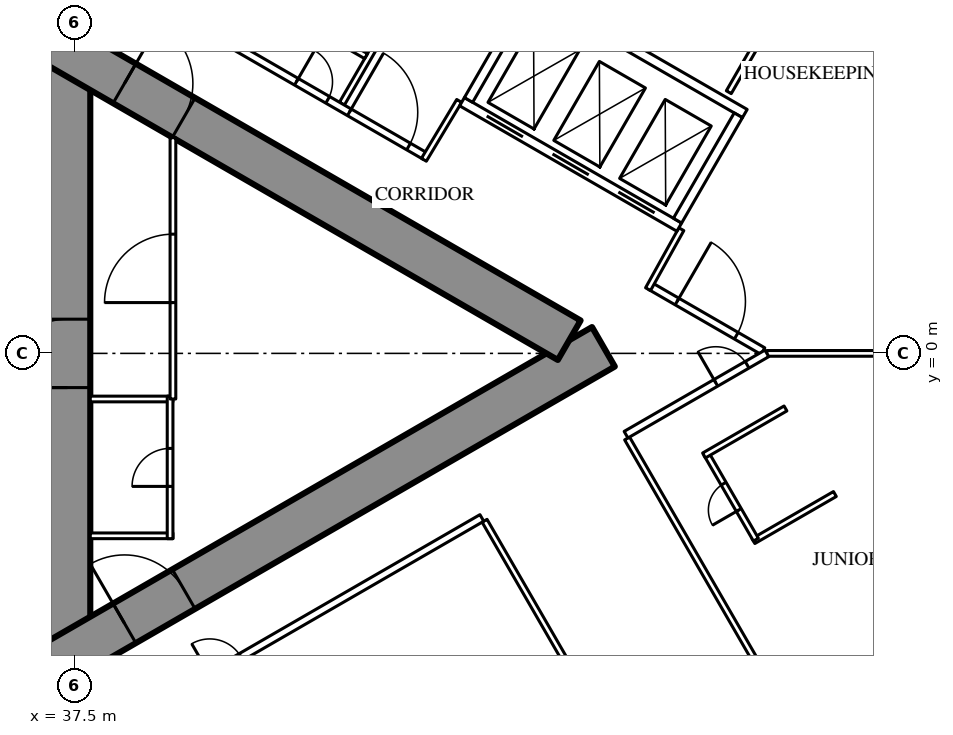
"""IFC4 building model, lengths in metres.
Left out: names, types, materials, properties, quantities, classifications, styles, units other than length and angle.
Written with IfcOpenShell. Run it as: python <this file> out.ifc"""

import sys

from ifc_helpers import new_model, si_unit, direction, frame, frame_2d, origin, place, context, subcontext, project, spatial, rectangle, extrude, element, fill, save


model = new_model("IFC4")
c1 = context("Model", 3, precision=1e-05, world=origin(), true_north=direction((0.0, 1.0)))
c2 = subcontext(c1, "Body", "Model", "MODEL_VIEW")
j1 = project(units=[si_unit("LENGTHUNIT", "METRE"), si_unit("PLANEANGLEUNIT", "RADIAN")], contexts=[c1])
p1 = place(None, origin())
s1 = spatial("IfcSite", under=j1, at=p1, CompositionType="ELEMENT")
p2 = place(p1, origin())
s2 = spatial("IfcBuilding", under=s1, at=p2, CompositionType="ELEMENT")
p3 = place(p2, frame((0.0, 0.0, 180.8)))
s3 = spatial("IfcBuildingStorey", under=s2, at=p3, CompositionType="ELEMENT", Elevation=180.8)
p4 = place(p3, frame((37.3, -8.6, 0.0), z_axis=(0.0, 0.0, 1.0), x_axis=(0.0, 1.0, 0.0)))
e1 = element("IfcWall", 1, at=p4, inside=s3, PredefinedType="SHEAR", context=c2, shape_type="SweptSolid", body=[
    extrude(rectangle(XDim=17.2, YDim=1.2, at=frame_2d((8.6, 0.0))), origin(), (0.0, 0.0, 1.0), 3.5),
])
p5 = place(p4, frame((7.7, 0.0, 0.0)))
e2 = element("IfcOpeningElement", 2, at=p5, cuts=e1, PredefinedType="OPENING", context=c2, shape_type="SweptSolid", body=[
    extrude(rectangle(XDim=1.8, YDim=2.2, at=frame_2d((0.9, 1.1))), frame((0.0, 0.61, 0.0), z_axis=(0.0, -1.0, 0.0), x_axis=(1.0, 0.0, 0.0)), (0.0, 0.0, 1.0), 1.22),
])
p6 = place(p3, frame((27.2, -13.8, 0.0), z_axis=(0.0, 0.0, 1.0), x_axis=(0.866027159892, 0.499996958321, 0.0)))
e3 = element("IfcWall", 3, at=p6, inside=s3, PredefinedType="SHEAR", context=c2, shape_type="SweptSolid", body=[
    extrude(rectangle(XDim=27.947, YDim=1.2, at=frame_2d((13.973, 0.0))), origin(), (0.0, 0.0, 1.0), 3.5),
])
p7 = place(p6, frame((4.6, 0.0, 0.0)))
e4 = element("IfcOpeningElement", 4, at=p7, cuts=e3, PredefinedType="OPENING", context=c2, shape_type="SweptSolid", body=[
    extrude(rectangle(XDim=1.0, YDim=2.2, at=frame_2d((0.5, 1.1))), frame((0.0, 0.61, 0.0), z_axis=(0.0, -1.0, 0.0), x_axis=(1.0, 0.0, 0.0)), (0.0, 0.0, 1.0), 1.22),
])
p8 = place(p6, frame((13.395, 0.0, 0.0)))
e5 = element("IfcOpeningElement", 5, at=p8, cuts=e3, PredefinedType="OPENING", context=c2, shape_type="SweptSolid", body=[
    extrude(rectangle(XDim=1.8, YDim=2.2, at=frame_2d((0.9, 1.1))), frame((0.0, 0.61, 0.0), z_axis=(0.0, -1.0, 0.0), x_axis=(1.0, 0.0, 0.0)), (0.0, 0.0, 1.0), 1.22),
])
p9 = place(p3, frame((27.2, 13.8, 0.0), z_axis=(0.0, 0.0, 1.0), x_axis=(0.866024515034, -0.500001539357, 0.0)))
e6 = element("IfcWall", 6, at=p9, inside=s3, PredefinedType="SHEAR", context=c2, shape_type="SweptSolid", body=[
    extrude(rectangle(XDim=26.907, YDim=1.2, at=frame_2d((13.454, 0.0))), origin(), (0.0, 0.0, 1.0), 3.5),
])
p10 = place(p9, frame((4.6, 0.0, 0.0)))
e7 = element("IfcOpeningElement", 7, at=p10, cuts=e6, PredefinedType="OPENING", context=c2, shape_type="SweptSolid", body=[
    extrude(rectangle(XDim=1.0, YDim=2.2, at=frame_2d((0.5, 1.1))), frame((0.0, 0.61, 0.0), z_axis=(0.0, -1.0, 0.0), x_axis=(1.0, 0.0, 0.0)), (0.0, 0.0, 1.0), 1.22),
])
p11 = place(p9, frame((13.395, 0.0, 0.0)))
e8 = element("IfcOpeningElement", 8, at=p11, cuts=e6, PredefinedType="OPENING", context=c2, shape_type="SweptSolid", body=[
    extrude(rectangle(XDim=1.8, YDim=2.2, at=frame_2d((0.9, 1.1))), frame((0.0, 0.61, 0.0), z_axis=(0.0, -1.0, 0.0), x_axis=(1.0, 0.0, 0.0)), (0.0, 0.0, 1.0), 1.22),
])
p12 = place(p3, frame((48.275, -4.404, 0.0), z_axis=(0.0, 0.0, 1.0), x_axis=(0.500006004368, -0.866021937133, 0.0)))
e9 = element("IfcWall", 9, at=p12, inside=s3, PredefinedType="PARTITIONING", context=c2, shape_type="SweptSolid", body=[
    extrude(rectangle(XDim=7.279, YDim=0.15, at=frame_2d((3.64, 0.0))), origin(), (0.0, 0.0, 1.0), 2.3),
])
p13 = place(p3, frame((52.025, -2.238, 0.0), z_axis=(0.0, 0.0, 1.0), x_axis=(0.499983785035, -0.866034765296, 0.0)))
e10 = element("IfcWall", 10, at=p13, inside=s3, PredefinedType="PARTITIONING", context=c2, shape_type="SweptSolid", body=[
    extrude(rectangle(XDim=7.116, YDim=0.15, at=frame_2d((3.558, 0.0))), origin(), (0.0, 0.0, 1.0), 2.3),
])
p14 = place(p3, frame((44.521, 6.571, 0.0), z_axis=(0.0, 0.0, 1.0), x_axis=(0.500020376429, 0.866013639128, 0.0)))
e11 = element("IfcWall", 11, at=p14, inside=s3, PredefinedType="PARTITIONING", context=c2, shape_type="SweptSolid", body=[
    extrude(rectangle(XDim=7.306, YDim=0.15, at=frame_2d((3.653, 0.0))), origin(), (0.0, 0.0, 1.0), 2.3),
])
p15 = place(p3, frame((55.702, 0.0, 0.0), z_axis=(0.0, 0.0, 1.0), x_axis=(1.0, 0.0, 0.0)))
e12 = element("IfcWall", 12, at=p15, inside=s3, PredefinedType="PARTITIONING", context=c2, shape_type="SweptSolid", body=[
    extrude(rectangle(XDim=8.518, YDim=0.15, at=frame_2d((4.259, 0.0))), origin(), (0.0, 0.0, 1.0), 2.3),
])
p16 = place(p3, frame((54.7, 6.872, 0.0), z_axis=(0.0, 0.0, 1.0), x_axis=(0.499989690894, 0.866031355668, 0.0)))
e13 = element("IfcWall", 13, at=p16, inside=s3, PredefinedType="PARTITIONING", context=c2, shape_type="SweptSolid", body=[
    extrude(rectangle(XDim=1.766, YDim=0.15, at=frame_2d((0.883, 0.0))), origin(), (0.0, 0.0, 1.0), 3.25),
])
p17 = place(p3, frame((27.959, 16.017, 0.0), z_axis=(0.0, 0.0, 1.0), x_axis=(0.866027146794, -0.499996981007, 0.0)))
e14 = element("IfcWall", 14, at=p17, inside=s3, PredefinedType="PARTITIONING", context=c2, shape_type="SweptSolid", body=[
    extrude(rectangle(XDim=21.657, YDim=0.2, at=frame_2d((10.829, 0.0))), origin(), (0.0, 0.0, 1.0), 3.25),
])
p18 = place(p17, frame((17.741, 0.0, 0.0)))
e15 = element("IfcOpeningElement", 15, at=p18, cuts=e14, PredefinedType="OPENING", context=c2, shape_type="SweptSolid", body=[
    extrude(rectangle(XDim=0.95, YDim=2.2, at=frame_2d((0.475, 1.1))), frame((0.0, 0.11, 0.0), z_axis=(0.0, -1.0, 0.0), x_axis=(1.0, 0.0, 0.0)), (0.0, 0.0, 1.0), 0.22),
])
p19 = place(p17, frame((10.782, 0.0, 0.0)))
e16 = element("IfcOpeningElement", 16, at=p19, cuts=e14, PredefinedType="OPENING", context=c2, shape_type="SweptSolid", body=[
    extrude(rectangle(XDim=0.95, YDim=2.2, at=frame_2d((0.475, 1.1))), frame((0.0, 0.11, 0.0), z_axis=(0.0, -1.0, 0.0), x_axis=(1.0, 0.0, 0.0)), (0.0, 0.0, 1.0), 0.22),
])
p20 = place(p17, frame((6.732, 0.0, 0.0)))
e17 = element("IfcOpeningElement", 17, at=p20, cuts=e14, PredefinedType="OPENING", context=c2, shape_type="SweptSolid", body=[
    extrude(rectangle(XDim=0.95, YDim=2.2, at=frame_2d((0.475, 1.1))), frame((0.0, 0.11, 0.0), z_axis=(0.0, -1.0, 0.0), x_axis=(1.0, 0.0, 0.0)), (0.0, 0.0, 1.0), 0.22),
])
p21 = place(p17, frame((19.349, 0.0, 0.0)))
e18 = element("IfcOpeningElement", 18, at=p21, cuts=e14, PredefinedType="OPENING", context=c2, shape_type="SweptSolid", body=[
    extrude(rectangle(XDim=1.8, YDim=2.2, at=frame_2d((0.9, 1.1))), frame((0.0, 0.11, 0.0), z_axis=(0.0, -1.0, 0.0), x_axis=(1.0, 0.0, 0.0)), (0.0, 0.0, 1.0), 0.22),
])
p22 = place(p3, frame((52.639, 1.769, 0.0), z_axis=(0.0, 0.0, 1.0), x_axis=(0.866027340901, -0.4999966448, 0.0)))
e19 = element("IfcWall", 19, at=p22, inside=s3, PredefinedType="PARTITIONING", context=c2, shape_type="SweptSolid", body=[
    extrude(rectangle(XDim=3.417, YDim=0.2, at=frame_2d((1.708, 0.0))), origin(), (0.0, 0.0, 1.0), 3.25),
])
p23 = place(p22, frame((0.809, 0.0, 0.0)))
e20 = element("IfcOpeningElement", 20, at=p23, cuts=e19, PredefinedType="OPENING", context=c2, shape_type="SweptSolid", body=[
    extrude(rectangle(XDim=1.8, YDim=2.2, at=frame_2d((0.9, 1.1))), frame((0.0, 0.11, 0.0), z_axis=(0.0, -1.0, 0.0), x_axis=(1.0, 0.0, 0.0)), (0.0, 0.0, 1.0), 0.22),
])
for number, where, z_axis, x_axis in (
    (21, (52.576, 1.689, 0.0), (0.0, 0.0, 1.0), (0.485, 0.874, 0.0)),
    (22, (47.606, 6.643, 0.0), (0.0, 0.0, 1.0), (-0.514, -0.858, 0.0)),
):
    element("IfcWall", number, at=place(p3, frame(where, z_axis=z_axis, x_axis=x_axis)), inside=s3, PredefinedType="PARTITIONING", context=c2, shape_type="SweptSolid", body=[
        extrude(rectangle(XDim=1.805, YDim=0.15, at=frame_2d((0.902, 0.0))), origin(), (0.0, 0.0, 1.0), 3.25),
    ])
p24 = place(p3, frame((27.959, -16.017, 0.0), z_axis=(0.0, 0.0, 1.0), x_axis=(0.866024180982, 0.50000211795, 0.0)))
e23 = element("IfcWall", 23, at=p24, inside=s3, PredefinedType="PARTITIONING", context=c2, shape_type="SweptSolid", body=[
    extrude(rectangle(XDim=23.375, YDim=0.2, at=frame_2d((11.688, 0.0))), origin(), (0.0, 0.0, 1.0), 3.25),
])
p25 = place(p24, frame((2.415, 0.0, 0.0)))
e24 = element("IfcOpeningElement", 24, at=p25, cuts=e23, PredefinedType="OPENING", context=c2, shape_type="SweptSolid", body=[
    extrude(rectangle(XDim=0.95, YDim=2.2, at=frame_2d((0.475, 1.1))), frame((0.0, 0.11, 0.0), z_axis=(0.0, -1.0, 0.0), x_axis=(1.0, 0.0, 0.0)), (0.0, 0.0, 1.0), 0.22),
])
p26 = place(p24, frame((9.215, 0.0, 0.0)))
e25 = element("IfcOpeningElement", 25, at=p26, cuts=e23, PredefinedType="OPENING", context=c2, shape_type="SweptSolid", body=[
    extrude(rectangle(XDim=1.0, YDim=2.2, at=frame_2d((0.5, 1.1))), frame((0.0, 0.11, 0.0), z_axis=(0.0, -1.0, 0.0), x_axis=(1.0, 0.0, 0.0)), (0.0, 0.0, 1.0), 0.22),
])
p27 = place(p24, frame((15.109, 0.0, 0.0)))
e26 = element("IfcOpeningElement", 26, at=p27, cuts=e23, PredefinedType="OPENING", context=c2, shape_type="SweptSolid", body=[
    extrude(rectangle(XDim=0.95, YDim=2.2, at=frame_2d((0.475, 1.1))), frame((0.0, 0.11, 0.0), z_axis=(0.0, -1.0, 0.0), x_axis=(1.0, 0.0, 0.0)), (0.0, 0.0, 1.0), 0.22),
])
p28 = place(p3, frame((51.997, -2.139, 0.0), z_axis=(0.0, 0.0, 1.0), x_axis=(0.866036399848, 0.499980953776, 0.0)))
e27 = element("IfcWall", 27, at=p28, inside=s3, PredefinedType="PARTITIONING", context=c2, shape_type="SweptSolid", body=[
    extrude(rectangle(XDim=4.279, YDim=0.2, at=frame_2d((2.139, 0.0))), origin(), (0.0, 0.0, 1.0), 3.25),
])
p29 = place(p28, frame((2.729, 0.0, 0.0)))
e28 = element("IfcOpeningElement", 28, at=p29, cuts=e27, PredefinedType="OPENING", context=c2, shape_type="SweptSolid", body=[
    extrude(rectangle(XDim=0.95, YDim=2.2, at=frame_2d((0.475, 1.1))), frame((0.0, 0.11, 0.0), z_axis=(0.0, -1.0, 0.0), x_axis=(1.0, 0.0, 0.0)), (0.0, 0.0, 1.0), 0.22),
])
p30 = place(p3, frame((55.349, -4.938, 0.0), z_axis=(0.0, 0.0, 1.0), x_axis=(0.866006523861, 0.500032699561, 0.0)))
e29 = element("IfcWall", 29, at=p30, inside=s3, PredefinedType="PARTITIONING", context=c2, shape_type="SweptSolid", body=[
    extrude(rectangle(XDim=2.475, YDim=0.15, at=frame_2d((1.237, 0.0))), origin(), (0.0, 0.0, 1.0), 3.25),
])
p31 = place(p3, frame((54.114, -2.649, 0.0), z_axis=(0.0, 0.0, 1.0), x_axis=(0.500006934395, -0.866021400173, 0.0)))
e30 = element("IfcWall", 30, at=p31, inside=s3, PredefinedType="PARTITIONING", context=c2, shape_type="SweptSolid", body=[
    extrude(rectangle(XDim=2.6, YDim=0.15, at=frame_2d((1.3, 0.0))), origin(), (0.0, 0.0, 1.0), 3.25),
])
p32 = place(p31, frame((0.9, 0.0, 0.0)))
e31 = element("IfcOpeningElement", 31, at=p32, cuts=e30, PredefinedType="OPENING", context=c2, shape_type="SweptSolid", body=[
    extrude(rectangle(XDim=0.8, YDim=2.2, at=frame_2d((0.4, 1.1))), frame((0.0, 0.085, 0.0), z_axis=(0.0, -1.0, 0.0), x_axis=(1.0, 0.0, 0.0)), (0.0, 0.0, 1.0), 0.17),
])
p33 = place(p3, frame((54.049, -2.687, 0.0), z_axis=(0.0, 0.0, 1.0), x_axis=(0.866006523861, 0.500032699561, 0.0)))
e32 = element("IfcWall", 32, at=p33, inside=s3, PredefinedType="PARTITIONING", context=c2, shape_type="SweptSolid", body=[
    extrude(rectangle(XDim=2.475, YDim=0.15, at=frame_2d((1.237, 0.0))), origin(), (0.0, 0.0, 1.0), 3.25),
])
p34 = place(p3, frame((43.013, 9.058, 0.0), z_axis=(0.0, 0.0, 1.0), x_axis=(0.866006523861, -0.500032699561, 0.0)))
e33 = element("IfcWall", 33, at=p34, inside=s3, PredefinedType="PARTITIONING", context=c2, shape_type="SweptSolid", body=[
    extrude(rectangle(XDim=2.475, YDim=0.15, at=frame_2d((1.237, 0.0))), origin(), (0.0, 0.0, 1.0), 2.45),
])
for number, where, z_axis, x_axis in (
    (34, (37.9, -1.2, 0.0), (0.0, 0.0, 1.0), (1.0, 0.0, 0.0)),
    (35, (37.9, -4.8, 0.0), (0.0, 0.0, 1.0), (1.0, 0.0, 0.0)),
):
    element("IfcWall", number, at=place(p3, frame(where, z_axis=z_axis, x_axis=x_axis)), inside=s3, PredefinedType="PARTITIONING", context=c2, shape_type="SweptSolid", body=[
        extrude(rectangle(XDim=2.175, YDim=0.15, at=frame_2d((1.087, 0.0))), origin(), (0.0, 0.0, 1.0), 3.25),
    ])
p35 = place(p3, frame((40.0, -4.875, 0.0), z_axis=(0.0, 0.0, 1.0), x_axis=(0.0, 1.0, 0.0)))
e36 = element("IfcWall", 36, at=p35, inside=s3, PredefinedType="PARTITIONING", context=c2, shape_type="SweptSolid", body=[
    extrude(rectangle(XDim=3.75, YDim=0.15, at=frame_2d((1.875, 0.0))), origin(), (0.0, 0.0, 1.0), 3.25),
])
p36 = place(p35, frame((1.375, 0.0, 0.0)))
e37 = element("IfcOpeningElement", 37, at=p36, cuts=e36, PredefinedType="OPENING", context=c2, shape_type="SweptSolid", body=[
    extrude(rectangle(XDim=1.0, YDim=2.2, at=frame_2d((0.5, 1.1))), frame((0.0, 0.085, 0.0), z_axis=(0.0, -1.0, 0.0), x_axis=(1.0, 0.0, 0.0)), (0.0, 0.0, 1.0), 0.17),
])
p37 = place(p3, frame((40.075, -1.2, 0.0), z_axis=(0.0, 0.0, 1.0), x_axis=(0.0, 1.0, 0.0)))
e38 = element("IfcWall", 38, at=p37, inside=s3, PredefinedType="PARTITIONING", context=c2, shape_type="SweptSolid", body=[
    extrude(rectangle(XDim=6.874, YDim=0.15, at=frame_2d((3.437, 0.0))), origin(), (0.0, 0.0, 1.0), 3.25),
])
p38 = place(p37, frame((2.537, 0.0, 0.0)))
e39 = element("IfcOpeningElement", 39, at=p38, cuts=e38, PredefinedType="OPENING", context=c2, shape_type="SweptSolid", body=[
    extrude(rectangle(XDim=1.8, YDim=2.2, at=frame_2d((0.9, 1.1))), frame((0.0, 0.085, 0.0), z_axis=(0.0, -1.0, 0.0), x_axis=(1.0, 0.0, 0.0)), (0.0, 0.0, 1.0), 0.17),
])
p39 = place(p3, frame((47.681, 6.622, 0.0), z_axis=(0.0, 0.0, 1.0), x_axis=(0.86603344179, -0.499986077507, 0.0)))
e40 = element("IfcWall", 40, at=p39, inside=s3, PredefinedType="PARTITIONING", context=c2, shape_type="SweptSolid", body=[
    extrude(rectangle(XDim=6.6, YDim=0.25, at=frame_2d((3.3, 0.0))), origin(), (0.0, 0.0, 1.0), 3.25),
])
p40 = place(p39, frame((0.75, 0.0, 0.0)))
e41 = element("IfcOpeningElement", 41, at=p40, cuts=e40, PredefinedType="OPENING", context=c2, shape_type="SweptSolid", body=[
    extrude(rectangle(XDim=1.1, YDim=2.2, at=frame_2d((0.55, 1.1))), frame((0.0, 0.135, 0.0), z_axis=(0.0, -1.0, 0.0), x_axis=(1.0, 0.0, 0.0)), (0.0, 0.0, 1.0), 0.27),
])
p41 = place(p39, frame((2.75, 0.0, 0.0)))
e42 = element("IfcOpeningElement", 42, at=p41, cuts=e40, PredefinedType="OPENING", context=c2, shape_type="SweptSolid", body=[
    extrude(rectangle(XDim=1.1, YDim=2.2, at=frame_2d((0.55, 1.1))), frame((0.0, 0.135, 0.0), z_axis=(0.0, -1.0, 0.0), x_axis=(1.0, 0.0, 0.0)), (0.0, 0.0, 1.0), 0.27),
])
p42 = place(p39, frame((4.75, 0.0, 0.0)))
e43 = element("IfcOpeningElement", 43, at=p42, cuts=e40, PredefinedType="OPENING", context=c2, shape_type="SweptSolid", body=[
    extrude(rectangle(XDim=1.1, YDim=2.2, at=frame_2d((0.55, 1.1))), frame((0.0, 0.135, 0.0), z_axis=(0.0, -1.0, 0.0), x_axis=(1.0, 0.0, 0.0)), (0.0, 0.0, 1.0), 0.27),
])
p43 = place(p3, frame((49.406, 9.611, 0.0), z_axis=(0.0, 0.0, 1.0), x_axis=(0.86603344179, -0.499986077507, 0.0)))
e44 = element("IfcWall", 44, at=p43, inside=s3, PredefinedType="PARTITIONING", context=c2, shape_type="SweptSolid", body=[
    extrude(rectangle(XDim=6.6, YDim=0.25, at=frame_2d((3.3, 0.0))), origin(), (0.0, 0.0, 1.0), 3.25),
])
p44 = place(p3, frame((47.852, 6.668, 0.0), z_axis=(0.0, 0.0, 1.0), x_axis=(0.499929347863, 0.866066190972, 0.0)))
e45 = element("IfcWall", 45, at=p44, inside=s3, PredefinedType="PARTITIONING", context=c2, shape_type="SweptSolid", body=[
    extrude(rectangle(XDim=3.201, YDim=0.25, at=frame_2d((1.6, 0.0))), origin(), (0.0, 0.0, 1.0), 3.25),
])
p45 = place(p3, frame((53.352, 3.493, 0.0), z_axis=(0.0, 0.0, 1.0), x_axis=(0.499872130319, 0.866099216793, 0.0)))
e46 = element("IfcWall", 46, at=p45, inside=s3, PredefinedType="PARTITIONING", context=c2, shape_type="SweptSolid", body=[
    extrude(rectangle(XDim=3.2, YDim=0.25, at=frame_2d((1.6, 0.0))), origin(), (0.0, 0.0, 1.0), 3.25),
])
p46 = place(p32, origin())
e47 = element("IfcDoor", 47, at=p46, inside=s3, OperationType="SINGLE_SWING_RIGHT", PredefinedType="DOOR", context=c2, shape_type="SweptSolid", body=[
    extrude(rectangle(XDim=0.8, YDim=2.2, at=frame_2d((0.4, 1.1))), frame((0.0, 0.025, 0.0), z_axis=(0.0, -1.0, 0.0), x_axis=(1.0, 0.0, 0.0)), (0.0, 0.0, 1.0), 0.05),
])
fill(e31, e47)
p47 = place(p29, origin())
e48 = element("IfcDoor", 48, at=p47, inside=s3, OperationType="SINGLE_SWING_LEFT", PredefinedType="DOOR", context=c2, shape_type="SweptSolid", body=[
    extrude(rectangle(XDim=0.95, YDim=2.2, at=frame_2d((0.475, 1.1))), frame((0.0, 0.025, 0.0), z_axis=(0.0, -1.0, 0.0), x_axis=(1.0, 0.0, 0.0)), (0.0, 0.0, 1.0), 0.05),
])
fill(e28, e48)
p48 = place(p18, origin())
e49 = element("IfcDoor", 49, at=p48, inside=s3, OperationType="SINGLE_SWING_LEFT", PredefinedType="DOOR", context=c2, shape_type="SweptSolid", body=[
    extrude(rectangle(XDim=0.95, YDim=2.2, at=frame_2d((0.475, 1.1))), frame((0.0, 0.025, 0.0), z_axis=(0.0, -1.0, 0.0), x_axis=(1.0, 0.0, 0.0)), (0.0, 0.0, 1.0), 0.05),
])
fill(e15, e49)
p49 = place(p23, origin())
e50 = element("IfcDoor", 50, at=p49, inside=s3, OperationType="DOUBLE_DOOR_SINGLE_SWING", PredefinedType="DOOR", context=c2, shape_type="SweptSolid", body=[
    extrude(rectangle(XDim=1.8, YDim=2.2, at=frame_2d((0.9, 1.1))), frame((0.0, 0.025, 0.0), z_axis=(0.0, -1.0, 0.0), x_axis=(1.0, 0.0, 0.0)), (0.0, 0.0, 1.0), 0.05),
])
fill(e20, e50)
p50 = place(p21, origin())
e51 = element("IfcDoor", 51, at=p50, inside=s3, OperationType="DOUBLE_DOOR_SINGLE_SWING", PredefinedType="DOOR", context=c2, shape_type="SweptSolid", body=[
    extrude(rectangle(XDim=1.8, YDim=2.2, at=frame_2d((0.9, 1.1))), frame((0.0, 0.025, 0.0), z_axis=(0.0, -1.0, 0.0), x_axis=(1.0, 0.0, 0.0)), (0.0, 0.0, 1.0), 0.05),
])
fill(e18, e51)
p51 = place(p36, origin())
e52 = element("IfcDoor", 52, at=p51, inside=s3, OperationType="SINGLE_SWING_LEFT", PredefinedType="DOOR", context=c2, shape_type="SweptSolid", body=[
    extrude(rectangle(XDim=1.0, YDim=2.2, at=frame_2d((0.5, 1.1))), frame((0.0, 0.025, 0.0), z_axis=(0.0, -1.0, 0.0), x_axis=(1.0, 0.0, 0.0)), (0.0, 0.0, 1.0), 0.05),
])
fill(e37, e52)
p52 = place(p38, origin())
e53 = element("IfcDoor", 53, at=p52, inside=s3, OperationType="DOUBLE_DOOR_SINGLE_SWING", PredefinedType="DOOR", context=c2, shape_type="SweptSolid", body=[
    extrude(rectangle(XDim=1.8, YDim=2.2, at=frame_2d((0.9, 1.1))), frame((0.0, 0.025, 0.0), z_axis=(0.0, -1.0, 0.0), x_axis=(1.0, 0.0, 0.0)), (0.0, 0.0, 1.0), 0.05),
])
fill(e39, e53)
p53 = place(p8, origin())
e54 = element("IfcDoor", 54, at=p53, inside=s3, OperationType="DOUBLE_DOOR_SINGLE_SWING", PredefinedType="DOOR", context=c2, shape_type="SweptSolid", body=[
    extrude(rectangle(XDim=1.8, YDim=2.2, at=frame_2d((0.9, 1.1))), frame((0.0, 0.025, 0.0), z_axis=(0.0, -1.0, 0.0), x_axis=(1.0, 0.0, 0.0)), (0.0, 0.0, 1.0), 0.05),
])
fill(e5, e54)
p54 = place(p11, origin())
e55 = element("IfcDoor", 55, at=p54, inside=s3, OperationType="DOUBLE_DOOR_SINGLE_SWING", PredefinedType="DOOR", context=c2, shape_type="SweptSolid", body=[
    extrude(rectangle(XDim=1.8, YDim=2.2, at=frame_2d((0.9, 1.1))), frame((0.0, 0.025, 0.0), z_axis=(0.0, -1.0, 0.0), x_axis=(1.0, 0.0, 0.0)), (0.0, 0.0, 1.0), 0.05),
])
fill(e8, e55)
p55 = place(p5, origin())
e56 = element("IfcDoor", 56, at=p55, inside=s3, OperationType="DOUBLE_DOOR_SINGLE_SWING", PredefinedType="DOOR", context=c2, shape_type="SweptSolid", body=[
    extrude(rectangle(XDim=1.8, YDim=2.2, at=frame_2d((0.9, 1.1))), frame((0.0, 0.025, 0.0), z_axis=(0.0, -1.0, 0.0), x_axis=(1.0, 0.0, 0.0)), (0.0, 0.0, 1.0), 0.05),
])
fill(e2, e56)
p56 = place(p40, origin())
e57 = element("IfcDoor", 57, at=p56, inside=s3, OperationType="DOUBLE_DOOR_SLIDING", PredefinedType="USERDEFINED", context=c2, shape_type="SweptSolid", body=[
    extrude(rectangle(XDim=1.1, YDim=2.2, at=frame_2d((0.55, 1.1))), frame((0.0, 0.025, 0.0), z_axis=(0.0, -1.0, 0.0), x_axis=(1.0, 0.0, 0.0)), (0.0, 0.0, 1.0), 0.05),
])
fill(e41, e57)
p57 = place(p41, origin())
e58 = element("IfcDoor", 58, at=p57, inside=s3, OperationType="DOUBLE_DOOR_SLIDING", PredefinedType="USERDEFINED", context=c2, shape_type="SweptSolid", body=[
    extrude(rectangle(XDim=1.1, YDim=2.2, at=frame_2d((0.55, 1.1))), frame((0.0, 0.025, 0.0), z_axis=(0.0, -1.0, 0.0), x_axis=(1.0, 0.0, 0.0)), (0.0, 0.0, 1.0), 0.05),
])
fill(e42, e58)
p58 = place(p42, origin())
e59 = element("IfcDoor", 59, at=p58, inside=s3, OperationType="DOUBLE_DOOR_SLIDING", PredefinedType="USERDEFINED", context=c2, shape_type="SweptSolid", body=[
    extrude(rectangle(XDim=1.1, YDim=2.2, at=frame_2d((0.55, 1.1))), frame((0.0, 0.025, 0.0), z_axis=(0.0, -1.0, 0.0), x_axis=(1.0, 0.0, 0.0)), (0.0, 0.0, 1.0), 0.05),
])
fill(e43, e59)
save(model, sys.argv[1])
